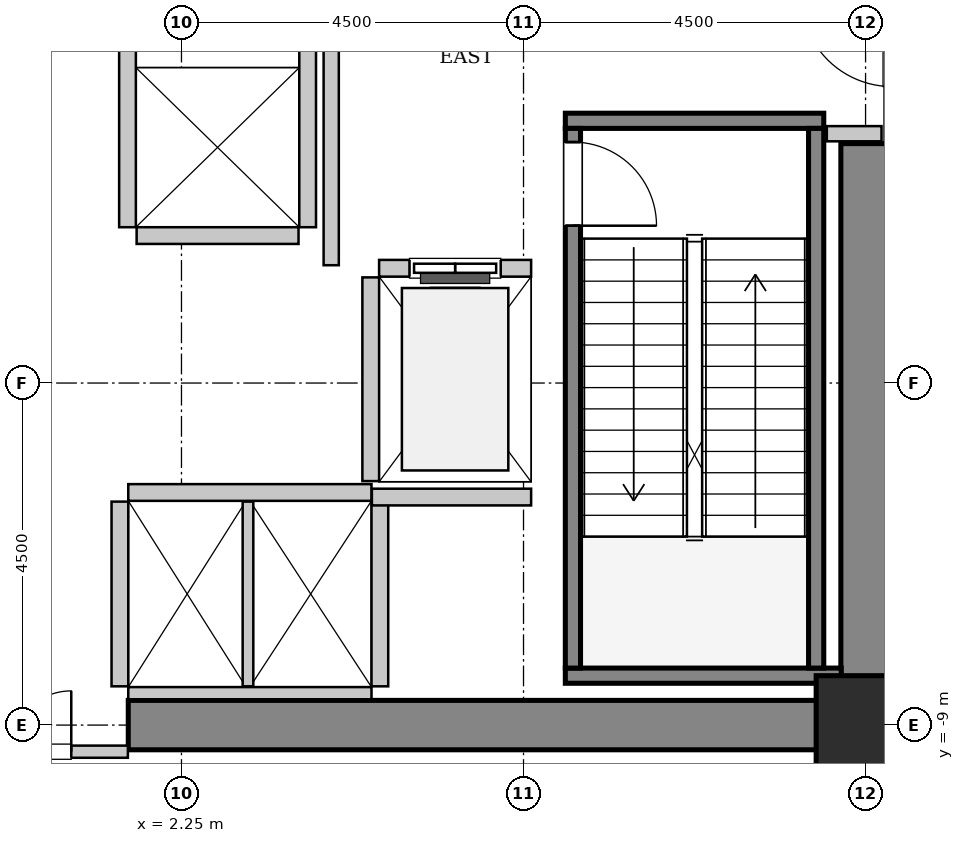
"""IFC4 building model, lengths in metres.
Left out: names, types, materials, properties, quantities, classifications, styles, units other than length and angle.
Written with IfcOpenShell. Run it as: python <this file> out.ifc"""

import sys

from ifc_helpers import new_model, si_unit, direction, frame, frame_2d, origin, origin_2d, place, context, subcontext, project, spatial, rectangle, hollow_rectangle, extrude, source, transform, mapped, element, fill, save


model = new_model("IFC4")
c1 = context("Model", 3, precision=1e-05, world=origin(), true_north=direction((0.0, 1.0)))
c2 = subcontext(c1, "Body", "Model", "MODEL_VIEW")
j1 = project(units=[si_unit("LENGTHUNIT", "METRE"), si_unit("PLANEANGLEUNIT", "RADIAN")], contexts=[c1])
p1 = place(None, origin())
s1 = spatial("IfcSite", under=j1, at=p1, CompositionType="ELEMENT")
p2 = place(p1, origin())
s2 = spatial("IfcBuilding", under=s1, at=p2, CompositionType="ELEMENT")
p3 = place(p2, frame((0.0, 0.0, 6.0)))
s3 = spatial("IfcBuildingStorey", under=s2, at=p3, CompositionType="ELEMENT", Elevation=6.0)
m1 = source(origin(), c2, "Body", "SweptSolid", [
    extrude(rectangle(XDim=10.025, YDim=0.65, at=frame_2d((5.012, 0.0))), origin(), (0.0, 0.0, 1.0), 5.4),
])
p4 = place(p3, frame((1.55, -9.0, 0.0), z_axis=(0.0, 0.0, 1.0), x_axis=(1.0, 0.0, 0.0)))
e1 = element("IfcWall", 1, at=p4, inside=s3, PredefinedType="SHEAR", context=c2, shape_type="MappedRepresentation", body=[
    mapped(m1, transform((0.0, 0.0, 0.0), x_axis=(1.0, 0.0, 0.0), y_axis=(0.0, 1.0, 0.0), z_axis=(0.0, 0.0, 1.0), scale=1.0)),
])
m2 = source(origin(), c2, "Body", "SweptSolid", [
    extrude(rectangle(XDim=7.325, YDim=0.65, at=frame_2d((3.663, 0.0))), origin(), (0.0, 0.0, 1.0), 5.4),
])
p5 = place(p3, frame((11.25, -8.675, 0.0), z_axis=(0.0, 0.0, 1.0), x_axis=(0.0, 1.0, 0.0)))
e2 = element("IfcWall", 2, at=p5, inside=s3, PredefinedType="SHEAR", context=c2, shape_type="MappedRepresentation", body=[
    mapped(m2, transform((0.0, 0.0, 0.0), x_axis=(1.0, 0.0, 0.0), y_axis=(0.0, 1.0, 0.0), z_axis=(0.0, 0.0, 1.0), scale=1.0)),
])
m3 = source(origin(), c2, "Body", "SweptSolid", [
    extrude(hollow_rectangle(XDim=1.3, YDim=1.3, WallThickness=0.065, InnerFilletRadius=0.065, OuterFilletRadius=0.13, at=origin_2d()), origin(), (0.0, 0.0, 1.0), 5.4),
])
p6 = place(p3, frame((11.25, -9.0, 0.0), z_axis=(0.0, 0.0, 1.0), x_axis=(1.0, 0.0, 0.0)))
e3 = element("IfcColumn", 3, at=p6, inside=s3, PredefinedType="COLUMN", context=c2, shape_type="MappedRepresentation", body=[
    mapped(m3, transform((0.0, 0.0, 0.0), x_axis=(1.0, 0.0, 0.0), y_axis=(0.0, 1.0, 0.0), z_axis=(0.0, 0.0, 1.0), scale=1.0)),
])
m4 = source(origin(), c2, "Body", "SweptSolid", [
    extrude(rectangle(XDim=3.4, YDim=0.2, at=frame_2d((1.7, 0.0))), origin(), (0.0, 0.0, 1.0), 5.4),
])
p7 = place(p3, frame((7.3, -1.05, 0.0), z_axis=(0.0, 0.0, 1.0), x_axis=(1.0, 0.0, 0.0)))
e4 = element("IfcWall", 4, at=p7, inside=s3, PredefinedType="SOLIDWALL", context=c2, shape_type="MappedRepresentation", body=[
    mapped(m4, transform((0.0, 0.0, 0.0), x_axis=(1.0, 0.0, 0.0), y_axis=(0.0, 1.0, 0.0), z_axis=(0.0, 0.0, 1.0), scale=1.0)),
])
m5 = source(origin(), c2, "Body", "SweptSolid", [
    extrude(rectangle(XDim=3.63, YDim=0.2, at=frame_2d((1.815, 0.0))), origin(), (0.0, 0.0, 1.0), 5.4),
])
p8 = place(p3, frame((7.3, -8.35, 0.0), z_axis=(0.0, 0.0, 1.0), x_axis=(1.0, 0.0, 0.0)))
e5 = element("IfcWall", 5, at=p8, inside=s3, PredefinedType="SOLIDWALL", context=c2, shape_type="MappedRepresentation", body=[
    mapped(m5, transform((0.0, 0.0, 0.0), x_axis=(1.0, 0.0, 0.0), y_axis=(0.0, 1.0, 0.0), z_axis=(0.0, 0.0, 1.0), scale=1.0)),
])
m6 = source(origin(), c2, "Body", "SweptSolid", [
    extrude(rectangle(XDim=7.1, YDim=0.2, at=frame_2d((3.55, 0.0))), origin(), (0.0, 0.0, 1.0), 5.4),
])
p9 = place(p3, frame((7.4, -1.15, 0.0), z_axis=(0.0, 0.0, 1.0), x_axis=(0.0, -1.0, 0.0)))
e6 = element("IfcWall", 6, at=p9, inside=s3, PredefinedType="SOLIDWALL", context=c2, shape_type="MappedRepresentation", body=[
    mapped(m6, transform((0.0, 0.0, 0.0), x_axis=(1.0, 0.0, 0.0), y_axis=(0.0, 1.0, 0.0), z_axis=(0.0, 0.0, 1.0), scale=1.0)),
])
p10 = place(p9, frame((0.18, 0.0, 0.0)))
e7 = element("IfcOpeningElement", 7, at=p10, cuts=e6, PredefinedType="OPENING", context=c2, shape_type="SweptSolid", body=[
    extrude(rectangle(XDim=1.1, YDim=2.15, at=frame_2d((0.55, 1.075))), frame((0.0, 0.11, 0.0), z_axis=(0.0, -1.0, 0.0), x_axis=(1.0, 0.0, 0.0)), (0.0, 0.0, 1.0), 0.22),
])
p11 = place(p3, frame((10.6, -1.15, 0.0), z_axis=(0.0, 0.0, 1.0), x_axis=(0.0, -1.0, 0.0)))
e8 = element("IfcWall", 8, at=p11, inside=s3, PredefinedType="SOLIDWALL", context=c2, shape_type="MappedRepresentation", body=[
    mapped(m6, transform((0.0, 0.0, 0.0), x_axis=(1.0, 0.0, 0.0), y_axis=(0.0, 1.0, 0.0), z_axis=(0.0, 0.0, 1.0), scale=1.0)),
])
m7 = source(origin(), c2, "Body", "SweptSolid", [
    extrude(rectangle(XDim=2.0, YDim=0.22, at=frame_2d((1.0, 0.0))), origin(), (0.0, 0.0, 1.0), 5.085),
])
p12 = place(p3, frame((6.85, -2.99, 0.0), z_axis=(0.0, 0.0, 1.0), x_axis=(-1.0, 0.0, 0.0)))
e9 = element("IfcWall", 9, at=p12, inside=s3, PredefinedType="SOLIDWALL", context=c2, shape_type="MappedRepresentation", body=[
    mapped(m7, transform((0.0, 0.0, 0.0), x_axis=(1.0, 0.0, 0.0), y_axis=(0.0, 1.0, 0.0), z_axis=(0.0, 0.0, 1.0), scale=1.0)),
])
p13 = place(p12, frame((0.4, 0.0, 0.0)))
e10 = element("IfcOpeningElement", 10, at=p13, cuts=e9, PredefinedType="OPENING", context=c2, shape_type="SweptSolid", body=[
    extrude(rectangle(XDim=1.2, YDim=2.2, at=frame_2d((0.6, 1.1))), frame((0.0, 0.12, 0.0), z_axis=(0.0, -1.0, 0.0), x_axis=(1.0, 0.0, 0.0)), (0.0, 0.0, 1.0), 0.24),
])
m8 = source(origin(), c2, "Body", "SweptSolid", [
    extrude(rectangle(XDim=2.68, YDim=0.22, at=frame_2d((1.34, 0.0))), origin(), (0.0, 0.0, 1.0), 5.085),
])
p14 = place(p3, frame((4.74, -3.11, 0.0), z_axis=(0.0, 0.0, 1.0), x_axis=(0.0, -1.0, 0.0)))
e11 = element("IfcWall", 11, at=p14, inside=s3, PredefinedType="SOLIDWALL", context=c2, shape_type="MappedRepresentation", body=[
    mapped(m8, transform((0.0, 0.0, 0.0), x_axis=(1.0, 0.0, 0.0), y_axis=(0.0, 1.0, 0.0), z_axis=(0.0, 0.0, 1.0), scale=1.0)),
])
m9 = source(origin(), c2, "Body", "SweptSolid", [
    extrude(rectangle(XDim=3.2, YDim=0.22, at=frame_2d((1.6, 0.0))), origin(), (0.0, 0.0, 1.0), 5.085),
])
p15 = place(p3, frame((4.75, -5.94, 0.0), z_axis=(0.0, 0.0, 1.0), x_axis=(-1.0, 0.0, 0.0)))
e12 = element("IfcWall", 12, at=p15, inside=s3, PredefinedType="SOLIDWALL", context=c2, shape_type="MappedRepresentation", body=[
    mapped(m9, transform((0.0, 0.0, 0.0), x_axis=(1.0, 0.0, 0.0), y_axis=(0.0, 1.0, 0.0), z_axis=(0.0, 0.0, 1.0), scale=1.0)),
])
m10 = source(origin(), c2, "Body", "SweptSolid", [
    extrude(rectangle(XDim=3.2, YDim=0.16, at=frame_2d((1.6, 0.0))), origin(), (0.0, 0.0, 1.0), 3.975),
])
p16 = place(p3, frame((1.55, -8.58, 0.0), z_axis=(0.0, 0.0, 1.0), x_axis=(1.0, 0.0, 0.0)))
e13 = element("IfcWall", 13, at=p16, inside=s3, PredefinedType="PARTITIONING", context=c2, shape_type="MappedRepresentation", body=[
    mapped(m10, transform((0.0, 0.0, 0.0), x_axis=(1.0, 0.0, 0.0), y_axis=(0.0, 1.0, 0.0), z_axis=(0.0, 0.0, 1.0), scale=1.0)),
])
m11 = source(origin(), c2, "Body", "SweptSolid", [
    extrude(rectangle(XDim=2.43, YDim=0.22, at=frame_2d((1.215, 0.0))), origin(), (0.0, 0.0, 1.0), 5.085),
])
p17 = place(p3, frame((1.44, -6.06, 0.0), z_axis=(0.0, 0.0, 1.0), x_axis=(0.0, -1.0, 0.0)))
e14 = element("IfcWall", 14, at=p17, inside=s3, PredefinedType="SOLIDWALL", context=c2, shape_type="MappedRepresentation", body=[
    mapped(m11, transform((0.0, 0.0, 0.0), x_axis=(1.0, 0.0, 0.0), y_axis=(0.0, 1.0, 0.0), z_axis=(0.0, 0.0, 1.0), scale=1.0)),
])
m12 = source(origin(), c2, "Body", "SweptSolid", [
    extrude(rectangle(XDim=2.43, YDim=0.14, at=frame_2d((1.215, 0.0))), origin(), (0.0, 0.0, 1.0), 5.085),
])
p18 = place(p3, frame((3.125, -8.49, 0.0), z_axis=(0.0, 0.0, 1.0), x_axis=(0.0, 1.0, 0.0)))
e15 = element("IfcWall", 15, at=p18, inside=s3, PredefinedType="PARTITIONING", context=c2, shape_type="MappedRepresentation", body=[
    mapped(m12, transform((0.0, 0.0, 0.0), x_axis=(1.0, 0.0, 0.0), y_axis=(0.0, 1.0, 0.0), z_axis=(0.0, 0.0, 1.0), scale=1.0)),
])
p19 = place(p3, frame((4.86, -8.49, 0.0), z_axis=(0.0, 0.0, 1.0), x_axis=(0.0, 1.0, 0.0)))
e16 = element("IfcWall", 16, at=p19, inside=s3, PredefinedType="SOLIDWALL", context=c2, shape_type="MappedRepresentation", body=[
    mapped(m11, transform((0.0, 0.0, 0.0), x_axis=(1.0, 0.0, 0.0), y_axis=(0.0, 1.0, 0.0), z_axis=(0.0, 0.0, 1.0), scale=1.0)),
])
m13 = source(origin(), c2, "Body", "SweptSolid", [
    extrude(rectangle(XDim=4.9, YDim=0.22, at=frame_2d((2.45, 0.0))), origin(), (0.0, 0.0, 1.0), 5.085),
])
for number, where, z_axis, x_axis in (
    (17, (1.54, 2.45, 0.0), (0.0, 0.0, 1.0), (0.0, -1.0, 0.0)),
    (18, (3.91, -2.45, 0.0), (0.0, 0.0, 1.0), (0.0, 1.0, 0.0)),
):
    element("IfcWall", number, at=place(p3, frame(where, z_axis=z_axis, x_axis=x_axis)), inside=s3, PredefinedType="SOLIDWALL", context=c2, shape_type="MappedRepresentation", body=[
        mapped(m13, transform((0.0, 0.0, 0.0), x_axis=(1.0, 0.0, 0.0), y_axis=(0.0, 1.0, 0.0), z_axis=(0.0, 0.0, 1.0), scale=1.0)),
    ])
m14 = source(origin(), c2, "Body", "SweptSolid", [
    extrude(rectangle(XDim=2.13, YDim=0.22, at=frame_2d((1.065, 0.0))), origin(), (0.0, 0.0, 1.0), 5.085),
])
p20 = place(p3, frame((1.66, -2.56, 0.0), z_axis=(0.0, 0.0, 1.0), x_axis=(1.0, 0.0, 0.0)))
e19 = element("IfcWall", 19, at=p20, inside=s3, PredefinedType="SOLIDWALL", context=c2, shape_type="MappedRepresentation", body=[
    mapped(m14, transform((0.0, 0.0, 0.0), x_axis=(1.0, 0.0, 0.0), y_axis=(0.0, 1.0, 0.0), z_axis=(0.0, 0.0, 1.0), scale=1.0)),
])
m15 = source(origin(), c2, "Body", "SweptSolid", [
    extrude(rectangle(XDim=2.095, YDim=0.22, at=frame_2d((1.048, 0.0))), origin(), (0.0, 0.0, 1.0), 5.085),
])
p21 = place(p3, frame((4.755, -6.0, 0.0), z_axis=(0.0, 0.0, 1.0), x_axis=(1.0, 0.0, 0.0)))
e20 = element("IfcWall", 20, at=p21, inside=s3, PredefinedType="SOLIDWALL", context=c2, shape_type="MappedRepresentation", body=[
    mapped(m15, transform((0.0, 0.0, 0.0), x_axis=(1.0, 0.0, 0.0), y_axis=(0.0, 1.0, 0.0), z_axis=(0.0, 0.0, 1.0), scale=1.0)),
])
m16 = source(origin(), c2, "Body", "SweptSolid", [
    extrude(rectangle(XDim=5.9, YDim=0.2, at=frame_2d((2.95, 0.0))), origin(), (0.0, 0.0, 1.0), 5.085),
])
p22 = place(p3, frame((4.22, -2.95, 0.0), z_axis=(0.0, 0.0, 1.0), x_axis=(0.0, 1.0, 0.0)))
e21 = element("IfcWall", 21, at=p22, inside=s3, PredefinedType="PARTITIONING", context=c2, shape_type="MappedRepresentation", body=[
    mapped(m16, transform((0.0, 0.0, 0.0), x_axis=(1.0, 0.0, 0.0), y_axis=(0.0, 1.0, 0.0), z_axis=(0.0, 0.0, 1.0), scale=1.0)),
])
m17 = source(origin(), c2, "Body", "SweptSolid", [
    extrude(rectangle(XDim=0.72, YDim=0.2, at=frame_2d((0.36, 0.0))), origin(), (0.0, 0.0, 1.0), 5.085),
])
p23 = place(p3, frame((10.74, -1.22, 0.0), z_axis=(0.0, 0.0, 1.0), x_axis=(1.0, 0.0, 0.0)))
e22 = element("IfcWall", 22, at=p23, inside=s3, PredefinedType="PARTITIONING", context=c2, shape_type="MappedRepresentation", body=[
    mapped(m17, transform((0.0, 0.0, 0.0), x_axis=(1.0, 0.0, 0.0), y_axis=(0.0, 1.0, 0.0), z_axis=(0.0, 0.0, 1.0), scale=1.0)),
])
m18 = source(origin(), c2, "Body", "SweptSolid", [
    extrude(rectangle(XDim=3.09, YDim=0.16, at=frame_2d((1.545, 0.0))), origin(), (0.0, 0.0, 1.0), 3.975),
])
p24 = place(p3, frame((-1.545, -9.35, 0.0), z_axis=(0.0, 0.0, 1.0), x_axis=(1.0, 0.0, 0.0)))
e23 = element("IfcWall", 23, at=p24, inside=s3, PredefinedType="PARTITIONING", context=c2, shape_type="MappedRepresentation", body=[
    mapped(m18, transform((0.0, 0.0, 0.0), x_axis=(1.0, 0.0, 0.0), y_axis=(0.0, 1.0, 0.0), z_axis=(0.0, 0.0, 1.0), scale=1.0)),
])
p25 = place(p24, frame((0.745, 0.0, 0.0)))
e24 = element("IfcOpeningElement", 24, at=p25, cuts=e23, PredefinedType="OPENING", context=c2, shape_type="SweptSolid", body=[
    extrude(rectangle(XDim=1.6, YDim=2.3, at=frame_2d((0.8, 1.15))), frame((0.0, 0.09, 0.0), z_axis=(0.0, -1.0, 0.0), x_axis=(1.0, 0.0, 0.0)), (0.0, 0.0, 1.0), 0.18),
])
m19 = source(origin(), c2, "Body", "SweptSolid", [
    extrude(rectangle(XDim=1.1, YDim=2.15, at=frame_2d((0.55, 1.075))), frame((0.0, 0.025, 0.0), z_axis=(0.0, -1.0, 0.0), x_axis=(1.0, 0.0, 0.0)), (0.0, 0.0, 1.0), 0.05),
])
p26 = place(p10, origin())
e25 = element("IfcDoor", 25, at=p26, inside=s3, OperationType="SINGLE_SWING_RIGHT", PredefinedType="DOOR", context=c2, shape_type="MappedRepresentation", body=[
    mapped(m19, transform((0.0, 0.0, 0.0), x_axis=(1.0, 0.0, 0.0), y_axis=(0.0, 1.0, 0.0), z_axis=(0.0, 0.0, 1.0), scale=1.0)),
])
fill(e7, e25)
m20 = source(origin(), c2, "Body", "SweptSolid", [
    extrude(rectangle(XDim=1.2, YDim=2.2, at=frame_2d((0.6, 1.1))), frame((0.0, 0.025, 0.0), z_axis=(0.0, -1.0, 0.0), x_axis=(1.0, 0.0, 0.0)), (0.0, 0.0, 1.0), 0.05),
])
p27 = place(p13, origin())
e26 = element("IfcDoor", 26, at=p27, inside=s3, OperationType="SLIDING_TO_LEFT", PredefinedType="DOOR", context=c2, shape_type="MappedRepresentation", body=[
    mapped(m20, transform((0.0, 0.0, 0.0), x_axis=(1.0, 0.0, 0.0), y_axis=(0.0, 1.0, 0.0), z_axis=(0.0, 0.0, 1.0), scale=1.0)),
])
fill(e10, e26)
m21 = source(origin(), c2, "Body", "SweptSolid", [
    extrude(rectangle(XDim=1.6, YDim=2.3, at=frame_2d((0.8, 1.15))), frame((0.0, 0.025, 0.0), z_axis=(0.0, -1.0, 0.0), x_axis=(1.0, 0.0, 0.0)), (0.0, 0.0, 1.0), 0.05),
])
p28 = place(p25, origin())
e27 = element("IfcDoor", 27, at=p28, inside=s3, OperationType="DOUBLE_DOOR_SINGLE_SWING", PredefinedType="DOOR", context=c2, shape_type="MappedRepresentation", body=[
    mapped(m21, transform((0.0, 0.0, 0.0), x_axis=(1.0, 0.0, 0.0), y_axis=(0.0, 1.0, 0.0), z_axis=(0.0, 0.0, 1.0), scale=1.0)),
])
fill(e24, e27)
save(model, sys.argv[1])
